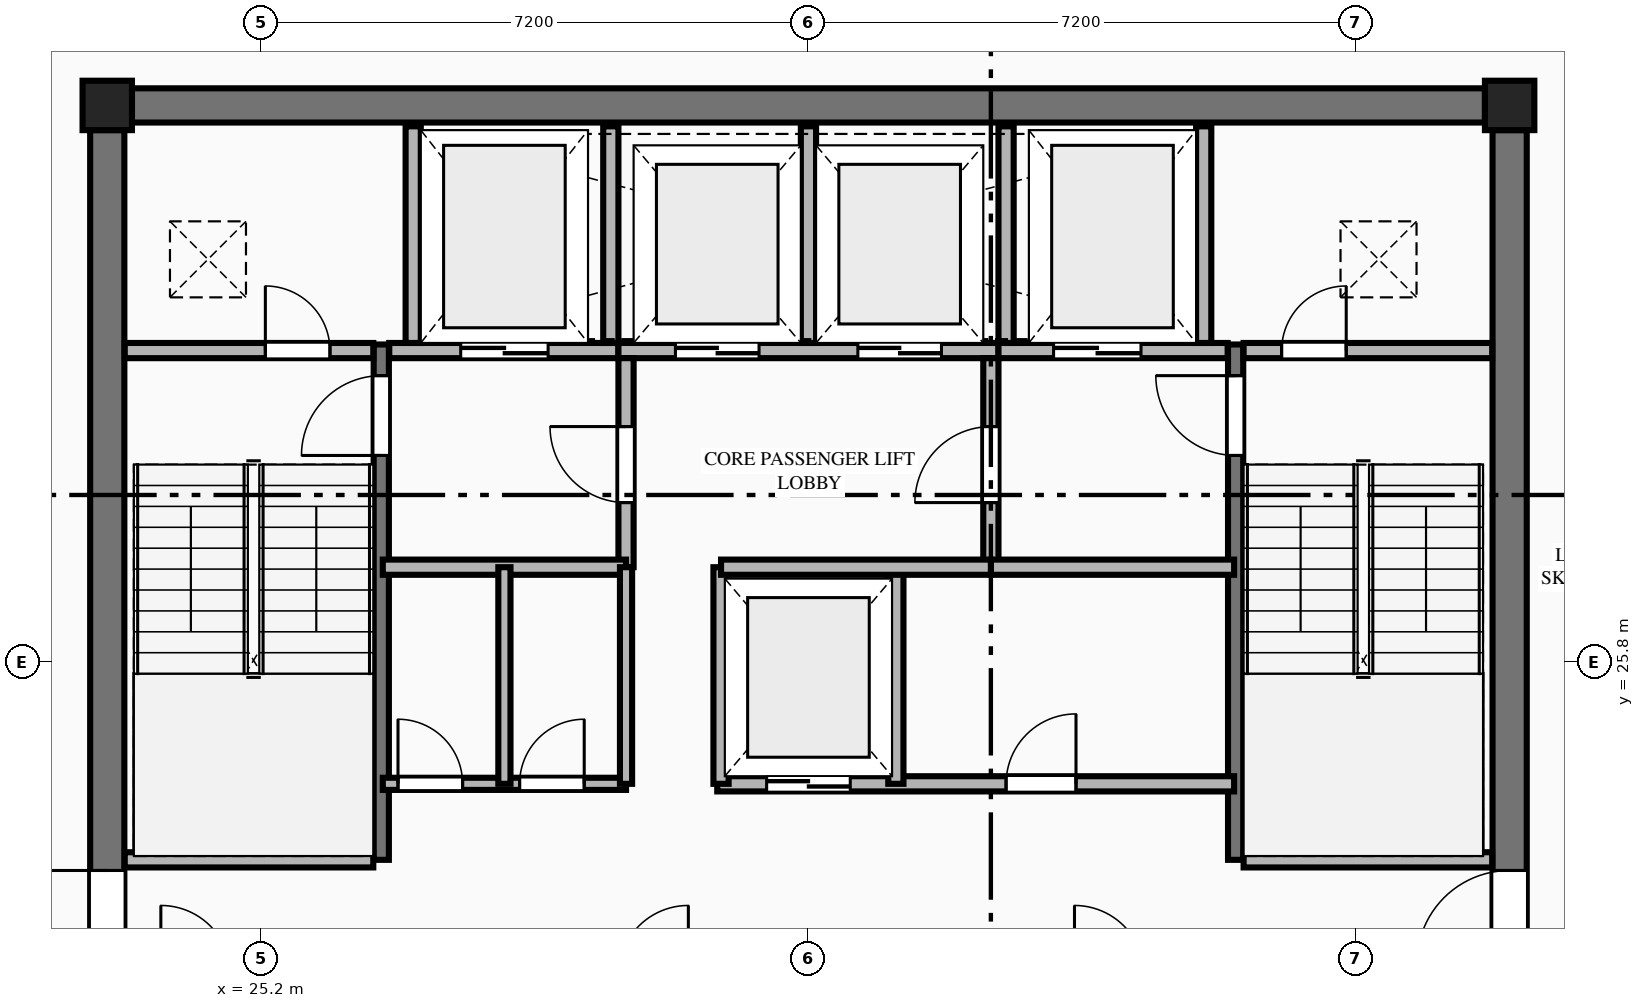
"""IFC4 building model, lengths in metres.
Left out: names, types, materials, properties, quantities, classifications, styles, units other than length and angle.
Written with IfcOpenShell. Run it as: python <this file> out.ifc"""

import sys

from ifc_helpers import new_model, si_unit, direction, frame, frame_2d, origin, origin_2d, place, context, subcontext, project, spatial, rectangle, extrude, element, fill, save


model = new_model("IFC4")
c1 = context("Model", 3, precision=1e-05, world=origin(), true_north=direction((0.0, 1.0)))
c2 = subcontext(c1, "Body", "Model", "MODEL_VIEW")
j1 = project(units=[si_unit("LENGTHUNIT", "METRE"), si_unit("PLANEANGLEUNIT", "RADIAN")], contexts=[c1])
p1 = place(None, origin())
s1 = spatial("IfcSite", under=j1, at=p1, CompositionType="ELEMENT")
p2 = place(p1, origin())
s2 = spatial("IfcBuilding", under=s1, at=p2, CompositionType="ELEMENT")
p3 = place(p2, frame((0.0, 0.0, 252.55)))
s3 = spatial("IfcBuildingStorey", under=s2, at=p3, CompositionType="ELEMENT", Elevation=252.55)
for number, where, z_axis, x_axis in (
    (1, (41.625, 33.125, 0.0), (0.0, 0.0, 1.0), (1.0, 0.0, 0.0)),
    (2, (23.175, 33.125, 0.0), (0.0, 0.0, 1.0), (1.0, 0.0, 0.0)),
):
    element("IfcColumn", number, at=place(p3, frame(where, z_axis=z_axis, x_axis=x_axis)), inside=s3, PredefinedType="COLUMN", context=c2, shape_type="SweptSolid", body=[
        extrude(rectangle(XDim=0.65, YDim=0.65, at=origin_2d()), origin(), (0.0, 0.0, 1.0), 3.65),
    ])
p4 = place(p3, frame((23.5, 33.125, 0.0), z_axis=(0.0, 0.0, 1.0), x_axis=(1.0, 0.0, 0.0)))
e3 = element("IfcWall", 3, at=p4, inside=s3, PredefinedType="SHEAR", context=c2, shape_type="SweptSolid", body=[
    extrude(rectangle(XDim=17.8, YDim=0.45, at=frame_2d((8.9, 0.0))), origin(), (0.0, 0.0, 1.0), 3.45),
])
p5 = place(p3, frame((23.175, 19.0, 0.0), z_axis=(0.0, 0.0, 1.0), x_axis=(0.0, 1.0, 0.0)))
e4 = element("IfcWall", 4, at=p5, inside=s3, PredefinedType="SHEAR", context=c2, shape_type="SweptSolid", body=[
    extrude(rectangle(XDim=13.8, YDim=0.45, at=frame_2d((6.9, 0.0))), origin(), (0.0, 0.0, 1.0), 3.45),
])
p6 = place(p5, frame((2.84, 0.0, 0.0)))
e5 = element("IfcOpeningElement", 5, at=p6, cuts=e4, PredefinedType="OPENING", context=c2, shape_type="SweptSolid", body=[
    extrude(rectangle(XDim=1.22, YDim=2.25, at=frame_2d((0.61, 1.125))), frame((0.0, 0.235, 0.0), z_axis=(0.0, -1.0, 0.0), x_axis=(1.0, 0.0, 0.0)), (0.0, 0.0, 1.0), 0.47),
])
p7 = place(p3, frame((41.625, 19.0, 0.0), z_axis=(0.0, 0.0, 1.0), x_axis=(0.0, 1.0, 0.0)))
e6 = element("IfcWall", 6, at=p7, inside=s3, PredefinedType="SHEAR", context=c2, shape_type="SweptSolid", body=[
    extrude(rectangle(XDim=13.8, YDim=0.45, at=frame_2d((6.9, 0.0))), origin(), (0.0, 0.0, 1.0), 3.45),
])
p8 = place(p7, frame((2.84, 0.0, 0.0)))
e7 = element("IfcOpeningElement", 7, at=p8, cuts=e6, PredefinedType="OPENING", context=c2, shape_type="SweptSolid", body=[
    extrude(rectangle(XDim=1.22, YDim=2.25, at=frame_2d((0.61, 1.125))), frame((0.0, 0.235, 0.0), z_axis=(0.0, -1.0, 0.0), x_axis=(1.0, 0.0, 0.0)), (0.0, 0.0, 1.0), 0.47),
])
p9 = place(p3, frame((26.78, 23.2, 0.0), z_axis=(0.0, 0.0, 1.0), x_axis=(0.0, 1.0, 0.0)))
e8 = element("IfcWall", 8, at=p9, inside=s3, PredefinedType="SHEAR", context=c2, shape_type="SweptSolid", body=[
    extrude(rectangle(XDim=6.78, YDim=0.2, at=frame_2d((3.39, 0.0))), origin(), (0.0, 0.0, 1.0), 3.65),
])
p10 = place(p9, frame((5.32, 0.0, 0.0)))
e9 = element("IfcOpeningElement", 9, at=p10, cuts=e8, PredefinedType="OPENING", context=c2, shape_type="SweptSolid", body=[
    extrude(rectangle(XDim=1.05, YDim=2.15, at=frame_2d((0.525, 1.075))), frame((0.0, 0.11, 0.0), z_axis=(0.0, -1.0, 0.0), x_axis=(1.0, 0.0, 0.0)), (0.0, 0.0, 1.0), 0.22),
])
p11 = place(p3, frame((23.405, 23.2, 0.0), z_axis=(0.0, 0.0, 1.0), x_axis=(1.0, 0.0, 0.0)))
e10 = element("IfcWall", 10, at=p11, inside=s3, PredefinedType="PLUMBINGWALL", context=c2, shape_type="SweptSolid", body=[
    extrude(rectangle(XDim=3.27, YDim=0.2, at=frame_2d((1.635, 0.0))), origin(), (0.0, 0.0, 1.0), 3.45),
])
p12 = place(p3, frame((38.02, 23.2, 0.0), z_axis=(0.0, 0.0, 1.0), x_axis=(0.0, 1.0, 0.0)))
e11 = element("IfcWall", 11, at=p12, inside=s3, PredefinedType="SHEAR", context=c2, shape_type="SweptSolid", body=[
    extrude(rectangle(XDim=6.78, YDim=0.2, at=frame_2d((3.39, 0.0))), origin(), (0.0, 0.0, 1.0), 3.65),
])
p13 = place(p12, frame((5.32, 0.0, 0.0)))
e12 = element("IfcOpeningElement", 12, at=p13, cuts=e11, PredefinedType="OPENING", context=c2, shape_type="SweptSolid", body=[
    extrude(rectangle(XDim=1.05, YDim=2.15, at=frame_2d((0.525, 1.075))), frame((0.0, 0.11, 0.0), z_axis=(0.0, -1.0, 0.0), x_axis=(1.0, 0.0, 0.0)), (0.0, 0.0, 1.0), 0.22),
])
p14 = place(p3, frame((38.125, 23.2, 0.0), z_axis=(0.0, 0.0, 1.0), x_axis=(1.0, 0.0, 0.0)))
e13 = element("IfcWall", 13, at=p14, inside=s3, PredefinedType="PLUMBINGWALL", context=c2, shape_type="SweptSolid", body=[
    extrude(rectangle(XDim=3.27, YDim=0.2, at=frame_2d((1.635, 0.0))), origin(), (0.0, 0.0, 1.0), 3.45),
])
p15 = place(p3, frame((23.405, 29.9, 0.0), z_axis=(0.0, 0.0, 1.0), x_axis=(1.0, 0.0, 0.0)))
e14 = element("IfcWall", 14, at=p15, inside=s3, PredefinedType="PLUMBINGWALL", context=c2, shape_type="SweptSolid", body=[
    extrude(rectangle(XDim=3.27, YDim=0.2, at=frame_2d((1.635, 0.0))), origin(), (0.0, 0.0, 1.0), 3.45),
])
p16 = place(p15, frame((1.85, 0.0, 0.0)))
e15 = element("IfcOpeningElement", 15, at=p16, cuts=e14, PredefinedType="OPENING", context=c2, shape_type="SweptSolid", body=[
    extrude(rectangle(XDim=0.85, YDim=2.05, at=frame_2d((0.425, 1.025))), frame((0.0, 0.11, 0.0), z_axis=(0.0, -1.0, 0.0), x_axis=(1.0, 0.0, 0.0)), (0.0, 0.0, 1.0), 0.22),
])
p17 = place(p3, frame((26.885, 29.9, 0.0), z_axis=(0.0, 0.0, 1.0), x_axis=(1.0, 0.0, 0.0)))
e16 = element("IfcWall", 16, at=p17, inside=s3, PredefinedType="PLUMBINGWALL", context=c2, shape_type="SweptSolid", body=[
    extrude(rectangle(XDim=3.015, YDim=0.2, at=frame_2d((1.507, 0.0))), origin(), (0.0, 0.0, 1.0), 3.45),
])
p18 = place(p17, frame((0.94, 0.0, 0.0)))
e17 = element("IfcOpeningElement", 17, at=p18, cuts=e16, PredefinedType="OPENING", context=c2, shape_type="SweptSolid", body=[
    extrude(rectangle(XDim=1.15, YDim=2.2, at=frame_2d((0.575, 1.1))), frame((0.0, 0.11, 0.0), z_axis=(0.0, -1.0, 0.0), x_axis=(1.0, 0.0, 0.0)), (0.0, 0.0, 1.0), 0.22),
])
p19 = place(p3, frame((29.9, 29.9, 0.0), z_axis=(0.0, 0.0, 1.0), x_axis=(1.0, 0.0, 0.0)))
e18 = element("IfcWall", 18, at=p19, inside=s3, PredefinedType="PLUMBINGWALL", context=c2, shape_type="SweptSolid", body=[
    extrude(rectangle(XDim=5.0, YDim=0.2, at=frame_2d((2.5, 0.0))), origin(), (0.0, 0.0, 1.0), 3.45),
])
p20 = place(p19, frame((0.75, 0.0, 0.0)))
e19 = element("IfcOpeningElement", 19, at=p20, cuts=e18, PredefinedType="OPENING", context=c2, shape_type="SweptSolid", body=[
    extrude(rectangle(XDim=1.1, YDim=2.2, at=frame_2d((0.55, 1.1))), frame((0.0, 0.11, 0.0), z_axis=(0.0, -1.0, 0.0), x_axis=(1.0, 0.0, 0.0)), (0.0, 0.0, 1.0), 0.22),
])
p21 = place(p19, frame((3.15, 0.0, 0.0)))
e20 = element("IfcOpeningElement", 20, at=p21, cuts=e18, PredefinedType="OPENING", context=c2, shape_type="SweptSolid", body=[
    extrude(rectangle(XDim=1.1, YDim=2.2, at=frame_2d((0.55, 1.1))), frame((0.0, 0.11, 0.0), z_axis=(0.0, -1.0, 0.0), x_axis=(1.0, 0.0, 0.0)), (0.0, 0.0, 1.0), 0.22),
])
p22 = place(p3, frame((34.9, 29.9, 0.0), z_axis=(0.0, 0.0, 1.0), x_axis=(1.0, 0.0, 0.0)))
e21 = element("IfcWall", 21, at=p22, inside=s3, PredefinedType="PLUMBINGWALL", context=c2, shape_type="SweptSolid", body=[
    extrude(rectangle(XDim=3.015, YDim=0.2, at=frame_2d((1.508, 0.0))), origin(), (0.0, 0.0, 1.0), 3.45),
])
p23 = place(p22, frame((0.725, 0.0, 0.0)))
e22 = element("IfcOpeningElement", 22, at=p23, cuts=e21, PredefinedType="OPENING", context=c2, shape_type="SweptSolid", body=[
    extrude(rectangle(XDim=1.15, YDim=2.2, at=frame_2d((0.575, 1.1))), frame((0.0, 0.11, 0.0), z_axis=(0.0, -1.0, 0.0), x_axis=(1.0, 0.0, 0.0)), (0.0, 0.0, 1.0), 0.22),
])
p24 = place(p3, frame((38.125, 29.9, 0.0), z_axis=(0.0, 0.0, 1.0), x_axis=(1.0, 0.0, 0.0)))
e23 = element("IfcWall", 23, at=p24, inside=s3, PredefinedType="PLUMBINGWALL", context=c2, shape_type="SweptSolid", body=[
    extrude(rectangle(XDim=3.27, YDim=0.2, at=frame_2d((1.635, 0.0))), origin(), (0.0, 0.0, 1.0), 3.45),
])
p25 = place(p24, frame((0.5, 0.0, 0.0)))
e24 = element("IfcOpeningElement", 24, at=p25, cuts=e23, PredefinedType="OPENING", context=c2, shape_type="SweptSolid", body=[
    extrude(rectangle(XDim=0.85, YDim=2.05, at=frame_2d((0.425, 1.025))), frame((0.0, 0.11, 0.0), z_axis=(0.0, -1.0, 0.0), x_axis=(1.0, 0.0, 0.0)), (0.0, 0.0, 1.0), 0.22),
])
for number, where, z_axis, x_axis in (
    (25, (27.2, 30.0, 0.0), (0.0, 0.0, 1.0), (0.0, 1.0, 0.0)),
    (26, (29.8, 30.0, 0.0), (0.0, 0.0, 1.0), (0.0, 1.0, 0.0)),
    (27, (32.4, 30.0, 0.0), (0.0, 0.0, 1.0), (0.0, 1.0, 0.0)),
    (28, (35.0, 30.0, 0.0), (0.0, 0.0, 1.0), (0.0, 1.0, 0.0)),
    (29, (37.6, 30.0, 0.0), (0.0, 0.0, 1.0), (0.0, 1.0, 0.0)),
):
    element("IfcWall", number, at=place(p3, frame(where, z_axis=z_axis, x_axis=x_axis)), inside=s3, PredefinedType="PLUMBINGWALL", context=c2, shape_type="SweptSolid", body=[
        extrude(rectangle(XDim=2.85, YDim=0.2, at=frame_2d((1.425, 0.0))), origin(), (0.0, 0.0, 1.0), 3.45),
    ])
p26 = place(p3, frame((30.0, 27.05, 0.0), z_axis=(0.0, 0.0, 1.0), x_axis=(0.0, 1.0, 0.0)))
e30 = element("IfcWall", 30, at=p26, inside=s3, PredefinedType="PLUMBINGWALL", context=c2, shape_type="SweptSolid", body=[
    extrude(rectangle(XDim=2.75, YDim=0.2, at=frame_2d((1.375, 0.0))), origin(), (0.0, 0.0, 1.0), 3.45),
])
p27 = place(p26, frame((0.85, 0.0, 0.0)))
e31 = element("IfcOpeningElement", 31, at=p27, cuts=e30, PredefinedType="OPENING", context=c2, shape_type="SweptSolid", body=[
    extrude(rectangle(XDim=1.0, YDim=2.15, at=frame_2d((0.5, 1.075))), frame((0.0, 0.11, 0.0), z_axis=(0.0, -1.0, 0.0), x_axis=(1.0, 0.0, 0.0)), (0.0, 0.0, 1.0), 0.22),
])
p28 = place(p3, frame((26.8, 27.05, 0.0), z_axis=(0.0, 0.0, 1.0), x_axis=(1.0, 0.0, 0.0)))
e32 = element("IfcWall", 32, at=p28, inside=s3, PredefinedType="PLUMBINGWALL", context=c2, shape_type="SweptSolid", body=[
    extrude(rectangle(XDim=3.2, YDim=0.2, at=frame_2d((1.6, 0.0))), origin(), (0.0, 0.0, 1.0), 3.45),
])
p29 = place(p3, frame((34.8, 27.05, 0.0), z_axis=(0.0, 0.0, 1.0), x_axis=(0.0, 1.0, 0.0)))
e33 = element("IfcWall", 33, at=p29, inside=s3, PredefinedType="PLUMBINGWALL", context=c2, shape_type="SweptSolid", body=[
    extrude(rectangle(XDim=2.75, YDim=0.2, at=frame_2d((1.375, 0.0))), origin(), (0.0, 0.0, 1.0), 3.45),
])
p30 = place(p29, frame((0.85, 0.0, 0.0)))
e34 = element("IfcOpeningElement", 34, at=p30, cuts=e33, PredefinedType="OPENING", context=c2, shape_type="SweptSolid", body=[
    extrude(rectangle(XDim=1.0, YDim=2.15, at=frame_2d((0.5, 1.075))), frame((0.0, 0.11, 0.0), z_axis=(0.0, -1.0, 0.0), x_axis=(1.0, 0.0, 0.0)), (0.0, 0.0, 1.0), 0.22),
])
p31 = place(p3, frame((34.8, 27.05, 0.0), z_axis=(0.0, 0.0, 1.0), x_axis=(1.0, 0.0, 0.0)))
e35 = element("IfcWall", 35, at=p31, inside=s3, PredefinedType="PLUMBINGWALL", context=c2, shape_type="SweptSolid", body=[
    extrude(rectangle(XDim=3.2, YDim=0.2, at=frame_2d((1.6, 0.0))), origin(), (0.0, 0.0, 1.0), 3.45),
])
p32 = place(p3, frame((26.8, 24.2, 0.0), z_axis=(0.0, 0.0, 1.0), x_axis=(1.0, 0.0, 0.0)))
e36 = element("IfcWall", 36, at=p32, inside=s3, PredefinedType="PARTITIONING", context=c2, shape_type="SweptSolid", body=[
    extrude(rectangle(XDim=3.2, YDim=0.16, at=frame_2d((1.6, 0.0))), origin(), (0.0, 0.0, 1.0), 3.45),
])
p33 = place(p32, frame((0.2, 0.0, 0.0)))
e37 = element("IfcOpeningElement", 37, at=p33, cuts=e36, PredefinedType="OPENING", context=c2, shape_type="SweptSolid", body=[
    extrude(rectangle(XDim=0.85, YDim=2.05, at=frame_2d((0.425, 1.025))), frame((0.0, 0.09, 0.0), z_axis=(0.0, -1.0, 0.0), x_axis=(1.0, 0.0, 0.0)), (0.0, 0.0, 1.0), 0.18),
])
p34 = place(p32, frame((1.8, 0.0, 0.0)))
e38 = element("IfcOpeningElement", 38, at=p34, cuts=e36, PredefinedType="OPENING", context=c2, shape_type="SweptSolid", body=[
    extrude(rectangle(XDim=0.85, YDim=2.05, at=frame_2d((0.425, 1.025))), frame((0.0, 0.09, 0.0), z_axis=(0.0, -1.0, 0.0), x_axis=(1.0, 0.0, 0.0)), (0.0, 0.0, 1.0), 0.18),
])
p35 = place(p3, frame((30.0, 24.2, 0.0), z_axis=(0.0, 0.0, 1.0), x_axis=(0.0, 1.0, 0.0)))
e39 = element("IfcWall", 39, at=p35, inside=s3, PredefinedType="PARTITIONING", context=c2, shape_type="SweptSolid", body=[
    extrude(rectangle(XDim=2.85, YDim=0.16, at=frame_2d((1.425, 0.0))), origin(), (0.0, 0.0, 1.0), 3.45),
])
p36 = place(p3, frame((31.2, 24.2, 0.0), z_axis=(0.0, 0.0, 1.0), x_axis=(1.0, 0.0, 0.0)))
e40 = element("IfcWall", 40, at=p36, inside=s3, PredefinedType="PLUMBINGWALL", context=c2, shape_type="SweptSolid", body=[
    extrude(rectangle(XDim=6.8, YDim=0.2, at=frame_2d((3.4, 0.0))), origin(), (0.0, 0.0, 1.0), 3.45),
])
p37 = place(p36, frame((0.65, 0.0, 0.0)))
e41 = element("IfcOpeningElement", 41, at=p37, cuts=e40, PredefinedType="OPENING", context=c2, shape_type="SweptSolid", body=[
    extrude(rectangle(XDim=1.1, YDim=2.2, at=frame_2d((0.55, 1.1))), frame((0.0, 0.11, 0.0), z_axis=(0.0, -1.0, 0.0), x_axis=(1.0, 0.0, 0.0)), (0.0, 0.0, 1.0), 0.22),
])
p38 = place(p36, frame((3.8, 0.0, 0.0)))
e42 = element("IfcOpeningElement", 42, at=p38, cuts=e40, PredefinedType="OPENING", context=c2, shape_type="SweptSolid", body=[
    extrude(rectangle(XDim=0.92, YDim=2.15, at=frame_2d((0.46, 1.075))), frame((0.0, 0.11, 0.0), z_axis=(0.0, -1.0, 0.0), x_axis=(1.0, 0.0, 0.0)), (0.0, 0.0, 1.0), 0.22),
])
for number, where, z_axis, x_axis in (
    (43, (31.25, 24.2, 0.0), (0.0, 0.0, 1.0), (0.0, 1.0, 0.0)),
    (44, (33.55, 24.2, 0.0), (0.0, 0.0, 1.0), (0.0, 1.0, 0.0)),
):
    element("IfcWall", number, at=place(p3, frame(where, z_axis=z_axis, x_axis=x_axis)), inside=s3, PredefinedType="PLUMBINGWALL", context=c2, shape_type="SweptSolid", body=[
        extrude(rectangle(XDim=2.85, YDim=0.2, at=frame_2d((1.425, 0.0))), origin(), (0.0, 0.0, 1.0), 3.45),
    ])
p39 = place(p3, frame((31.25, 27.05, 0.0), z_axis=(0.0, 0.0, 1.0), x_axis=(1.0, 0.0, 0.0)))
e45 = element("IfcWall", 45, at=p39, inside=s3, PredefinedType="PLUMBINGWALL", context=c2, shape_type="SweptSolid", body=[
    extrude(rectangle(XDim=3.55, YDim=0.2, at=frame_2d((1.775, 0.0))), origin(), (0.0, 0.0, 1.0), 3.45),
])
p40 = place(p3, frame((28.4, 24.2, 0.0), z_axis=(0.0, 0.0, 1.0), x_axis=(0.0, 1.0, 0.0)))
e46 = element("IfcWall", 46, at=p40, inside=s3, PredefinedType="PARTITIONING", context=c2, shape_type="SweptSolid", body=[
    extrude(rectangle(XDim=2.85, YDim=0.16, at=frame_2d((1.425, 0.0))), origin(), (0.0, 0.0, 1.0), 3.45),
])
p41 = place(p6, origin())
e47 = element("IfcDoor", 47, at=p41, inside=s3, OperationType="SINGLE_SWING_RIGHT", PredefinedType="DOOR", context=c2, shape_type="SweptSolid", body=[
    extrude(rectangle(XDim=1.22, YDim=2.25, at=frame_2d((0.61, 1.125))), frame((0.0, 0.025, 0.0), z_axis=(0.0, -1.0, 0.0), x_axis=(1.0, 0.0, 0.0)), (0.0, 0.0, 1.0), 0.05),
])
fill(e5, e47)
p42 = place(p8, origin())
e48 = element("IfcDoor", 48, at=p42, inside=s3, OperationType="SINGLE_SWING_LEFT", PredefinedType="DOOR", context=c2, shape_type="SweptSolid", body=[
    extrude(rectangle(XDim=1.22, YDim=2.25, at=frame_2d((0.61, 1.125))), frame((0.0, 0.025, 0.0), z_axis=(0.0, -1.0, 0.0), x_axis=(1.0, 0.0, 0.0)), (0.0, 0.0, 1.0), 0.05),
])
fill(e7, e48)
p43 = place(p10, origin())
e49 = element("IfcDoor", 49, at=p43, inside=s3, OperationType="SINGLE_SWING_LEFT", PredefinedType="DOOR", context=c2, shape_type="SweptSolid", body=[
    extrude(rectangle(XDim=1.05, YDim=2.15, at=frame_2d((0.525, 1.075))), frame((0.0, 0.025, 0.0), z_axis=(0.0, -1.0, 0.0), x_axis=(1.0, 0.0, 0.0)), (0.0, 0.0, 1.0), 0.05),
])
fill(e9, e49)
p44 = place(p13, origin())
e50 = element("IfcDoor", 50, at=p44, inside=s3, OperationType="SINGLE_SWING_RIGHT", PredefinedType="DOOR", context=c2, shape_type="SweptSolid", body=[
    extrude(rectangle(XDim=1.05, YDim=2.15, at=frame_2d((0.525, 1.075))), frame((0.0, 0.025, 0.0), z_axis=(0.0, -1.0, 0.0), x_axis=(1.0, 0.0, 0.0)), (0.0, 0.0, 1.0), 0.05),
])
fill(e12, e50)
p45 = place(p16, origin())
e51 = element("IfcDoor", 51, at=p45, inside=s3, OperationType="SINGLE_SWING_LEFT", PredefinedType="DOOR", context=c2, shape_type="SweptSolid", body=[
    extrude(rectangle(XDim=0.85, YDim=2.05, at=frame_2d((0.425, 1.025))), frame((0.0, 0.025, 0.0), z_axis=(0.0, -1.0, 0.0), x_axis=(1.0, 0.0, 0.0)), (0.0, 0.0, 1.0), 0.05),
])
fill(e15, e51)
p46 = place(p25, origin())
e52 = element("IfcDoor", 52, at=p46, inside=s3, OperationType="SINGLE_SWING_RIGHT", PredefinedType="DOOR", context=c2, shape_type="SweptSolid", body=[
    extrude(rectangle(XDim=0.85, YDim=2.05, at=frame_2d((0.425, 1.025))), frame((0.0, 0.025, 0.0), z_axis=(0.0, -1.0, 0.0), x_axis=(1.0, 0.0, 0.0)), (0.0, 0.0, 1.0), 0.05),
])
fill(e24, e52)
p47 = place(p18, origin())
e53 = element("IfcDoor", 53, at=p47, inside=s3, OperationType="DOUBLE_DOOR_SLIDING", PredefinedType="DOOR", context=c2, shape_type="SweptSolid", body=[
    extrude(rectangle(XDim=1.15, YDim=2.2, at=frame_2d((0.575, 1.1))), frame((0.0, 0.025, 0.0), z_axis=(0.0, -1.0, 0.0), x_axis=(1.0, 0.0, 0.0)), (0.0, 0.0, 1.0), 0.05),
])
fill(e17, e53)
p48 = place(p23, origin())
e54 = element("IfcDoor", 54, at=p48, inside=s3, OperationType="DOUBLE_DOOR_SLIDING", PredefinedType="DOOR", context=c2, shape_type="SweptSolid", body=[
    extrude(rectangle(XDim=1.15, YDim=2.2, at=frame_2d((0.575, 1.1))), frame((0.0, 0.025, 0.0), z_axis=(0.0, -1.0, 0.0), x_axis=(1.0, 0.0, 0.0)), (0.0, 0.0, 1.0), 0.05),
])
fill(e22, e54)
p49 = place(p20, origin())
e55 = element("IfcDoor", 55, at=p49, inside=s3, OperationType="DOUBLE_DOOR_SLIDING", PredefinedType="DOOR", context=c2, shape_type="SweptSolid", body=[
    extrude(rectangle(XDim=1.1, YDim=2.2, at=frame_2d((0.55, 1.1))), frame((0.0, 0.025, 0.0), z_axis=(0.0, -1.0, 0.0), x_axis=(1.0, 0.0, 0.0)), (0.0, 0.0, 1.0), 0.05),
])
fill(e19, e55)
p50 = place(p21, origin())
e56 = element("IfcDoor", 56, at=p50, inside=s3, OperationType="DOUBLE_DOOR_SLIDING", PredefinedType="DOOR", context=c2, shape_type="SweptSolid", body=[
    extrude(rectangle(XDim=1.1, YDim=2.2, at=frame_2d((0.55, 1.1))), frame((0.0, 0.025, 0.0), z_axis=(0.0, -1.0, 0.0), x_axis=(1.0, 0.0, 0.0)), (0.0, 0.0, 1.0), 0.05),
])
fill(e20, e56)
p51 = place(p27, origin())
e57 = element("IfcDoor", 57, at=p51, inside=s3, OperationType="SINGLE_SWING_RIGHT", PredefinedType="DOOR", context=c2, shape_type="SweptSolid", body=[
    extrude(rectangle(XDim=1.0, YDim=2.15, at=frame_2d((0.5, 1.075))), frame((0.0, 0.025, 0.0), z_axis=(0.0, -1.0, 0.0), x_axis=(1.0, 0.0, 0.0)), (0.0, 0.0, 1.0), 0.05),
])
fill(e31, e57)
p52 = place(p30, origin())
e58 = element("IfcDoor", 58, at=p52, inside=s3, OperationType="SINGLE_SWING_LEFT", PredefinedType="DOOR", context=c2, shape_type="SweptSolid", body=[
    extrude(rectangle(XDim=1.0, YDim=2.15, at=frame_2d((0.5, 1.075))), frame((0.0, 0.025, 0.0), z_axis=(0.0, -1.0, 0.0), x_axis=(1.0, 0.0, 0.0)), (0.0, 0.0, 1.0), 0.05),
])
fill(e34, e58)
p53 = place(p37, origin())
e59 = element("IfcDoor", 59, at=p53, inside=s3, OperationType="DOUBLE_DOOR_SLIDING", PredefinedType="DOOR", context=c2, shape_type="SweptSolid", body=[
    extrude(rectangle(XDim=1.1, YDim=2.2, at=frame_2d((0.55, 1.1))), frame((0.0, 0.025, 0.0), z_axis=(0.0, -1.0, 0.0), x_axis=(1.0, 0.0, 0.0)), (0.0, 0.0, 1.0), 0.05),
])
fill(e41, e59)
p54 = place(p33, origin())
e60 = element("IfcDoor", 60, at=p54, inside=s3, OperationType="SINGLE_SWING_LEFT", PredefinedType="DOOR", context=c2, shape_type="SweptSolid", body=[
    extrude(rectangle(XDim=0.85, YDim=2.05, at=frame_2d((0.425, 1.025))), frame((0.0, 0.025, 0.0), z_axis=(0.0, -1.0, 0.0), x_axis=(1.0, 0.0, 0.0)), (0.0, 0.0, 1.0), 0.05),
])
fill(e37, e60)
p55 = place(p34, origin())
e61 = element("IfcDoor", 61, at=p55, inside=s3, OperationType="SINGLE_SWING_RIGHT", PredefinedType="DOOR", context=c2, shape_type="SweptSolid", body=[
    extrude(rectangle(XDim=0.85, YDim=2.05, at=frame_2d((0.425, 1.025))), frame((0.0, 0.025, 0.0), z_axis=(0.0, -1.0, 0.0), x_axis=(1.0, 0.0, 0.0)), (0.0, 0.0, 1.0), 0.05),
])
fill(e38, e61)
p56 = place(p38, origin())
e62 = element("IfcDoor", 62, at=p56, inside=s3, OperationType="SINGLE_SWING_RIGHT", PredefinedType="DOOR", context=c2, shape_type="SweptSolid", body=[
    extrude(rectangle(XDim=0.92, YDim=2.15, at=frame_2d((0.46, 1.075))), frame((0.0, 0.025, 0.0), z_axis=(0.0, -1.0, 0.0), x_axis=(1.0, 0.0, 0.0)), (0.0, 0.0, 1.0), 0.05),
])
fill(e42, e62)
save(model, sys.argv[1])
